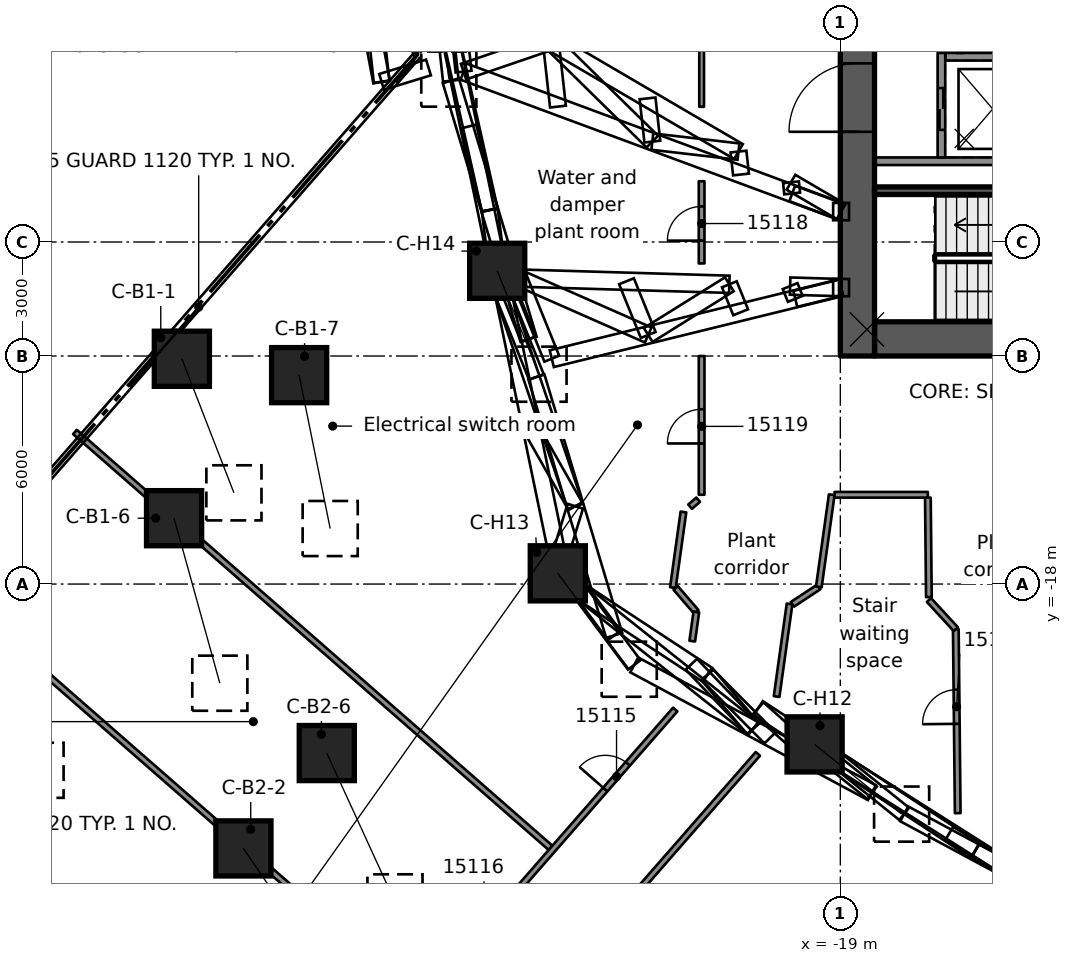
"""IFC4 building model, lengths in metres.
Left out: names, types, materials, properties, quantities, classifications, styles, units other than length and angle.
Written with IfcOpenShell. Run it as: python <this file> out.ifc"""

import sys

from ifc_helpers import new_model, si_unit, direction, frame, frame_2d, origin, origin_2d, place, context, subcontext, project, spatial, rectangle, extrude, element, fill, save


model = new_model("IFC4")
c1 = context("Model", 3, precision=1e-05, world=origin(), true_north=direction((0.0, 1.0)))
c2 = subcontext(c1, "Body", "Model", "MODEL_VIEW")
j1 = project(units=[si_unit("LENGTHUNIT", "METRE"), si_unit("PLANEANGLEUNIT", "RADIAN")], contexts=[c1])
p1 = place(None, origin())
s1 = spatial("IfcSite", under=j1, at=p1, CompositionType="ELEMENT")
p2 = place(p1, origin())
s2 = spatial("IfcBuilding", under=s1, at=p2, CompositionType="ELEMENT")
p3 = place(p2, frame((0.0, 0.0, 76.3)))
s3 = spatial("IfcBuildingStorey", under=s2, at=p3, CompositionType="ELEMENT", Elevation=76.3)
p4 = place(p3, frame((-18.1, -11.55, 0.0), z_axis=(0.0, 0.0, 1.0), x_axis=(1.0, 0.0, 0.0)))
e1 = element("IfcWall", 1, at=p4, inside=s3, PredefinedType="SHEAR", context=c2, shape_type="SweptSolid", body=[
    extrude(rectangle(XDim=9.2, YDim=0.9, at=frame_2d((4.6, 0.0))), origin(), (0.0, 0.0, 1.0), 4.4),
])
p5 = place(p4, frame((5.1, 0.0, 0.0)))
e2 = element("IfcOpeningElement", 2, at=p5, cuts=e1, PredefinedType="OPENING", context=c2, shape_type="SweptSolid", body=[
    extrude(rectangle(XDim=1.1, YDim=2.1, at=frame_2d((0.55, 1.05))), frame((0.0, 0.46, 0.0), z_axis=(0.0, -1.0, 0.0), x_axis=(1.0, 0.0, 0.0)), (0.0, 0.0, 1.0), 0.92),
])
p6 = place(p4, frame((7.53, 0.0, 0.0)))
e3 = element("IfcOpeningElement", 3, at=p6, cuts=e1, PredefinedType="OPENING", context=c2, shape_type="SweptSolid", body=[
    extrude(rectangle(XDim=0.9, YDim=2.1, at=frame_2d((0.45, 1.05))), frame((0.0, 0.46, 0.0), z_axis=(0.0, -1.0, 0.0), x_axis=(1.0, 0.0, 0.0)), (0.0, 0.0, 1.0), 0.92),
])
p7 = place(p3, frame((-18.55, -12.0, 0.0), z_axis=(0.0, 0.0, 1.0), x_axis=(0.0, 1.0, 0.0)))
e4 = element("IfcWall", 4, at=p7, inside=s3, PredefinedType="SHEAR", context=c2, shape_type="SweptSolid", body=[
    extrude(rectangle(XDim=24.0, YDim=0.9, at=frame_2d((12.0, 0.0))), origin(), (0.0, 0.0, 1.0), 4.4),
])
p8 = place(p7, frame((5.9, 0.0, 0.0)))
e5 = element("IfcOpeningElement", 5, at=p8, cuts=e4, PredefinedType="OPENING", context=c2, shape_type="SweptSolid", body=[
    extrude(rectangle(XDim=1.8, YDim=2.1, at=frame_2d((0.9, 1.05))), frame((0.0, 0.46, 0.0), z_axis=(0.0, -1.0, 0.0), x_axis=(1.0, 0.0, 0.0)), (0.0, 0.0, 1.0), 0.92),
])
p9 = place(p7, frame((10.1, 0.0, 0.0)))
e6 = element("IfcOpeningElement", 6, at=p9, cuts=e4, PredefinedType="OPENING", context=c2, shape_type="SweptSolid", body=[
    extrude(rectangle(XDim=1.8, YDim=2.1, at=frame_2d((0.9, 1.05))), frame((0.0, 0.46, 0.0), z_axis=(0.0, -1.0, 0.0), x_axis=(1.0, 0.0, 0.0)), (0.0, 0.0, 1.0), 0.92),
])
p10 = place(p7, frame((14.3, 0.0, 0.0)))
e7 = element("IfcOpeningElement", 7, at=p10, cuts=e4, PredefinedType="OPENING", context=c2, shape_type="SweptSolid", body=[
    extrude(rectangle(XDim=1.8, YDim=2.1, at=frame_2d((0.9, 1.05))), frame((0.0, 0.46, 0.0), z_axis=(0.0, -1.0, 0.0), x_axis=(1.0, 0.0, 0.0)), (0.0, 0.0, 1.0), 0.92),
])
p11 = place(p3, frame((-36.327, -12.072, 0.546), z_axis=(0.27252085226, -0.701871116737, 0.658110416704), x_axis=(0.93219702478, 0.361951249467, 0.0)))
e8 = element("IfcColumn", 8, at=p11, inside=s3, PredefinedType="COLUMN", context=c2, shape_type="SweptSolid", body=[
    extrude(rectangle(XDim=1.45, YDim=1.45, at=origin_2d()), origin(), (0.0, 0.0, 1.0), 5.027),
])
p12 = place(p3, frame((-42.009, -18.571, 0.599), z_axis=(0.324176218571, -0.760615129217, 0.562471692194), x_axis=(0.919932161278, 0.39207756713, 0.0)))
e9 = element("IfcColumn", 9, at=p12, inside=s3, PredefinedType="COLUMN", context=c2, shape_type="SweptSolid", body=[
    extrude(rectangle(XDim=1.45, YDim=1.45, at=origin_2d()), origin(), (0.0, 0.0, 1.0), 5.691),
])
p13 = place(p3, frame((-36.532, -16.267, 0.59), z_axis=(0.217420381869, -0.783982982798, 0.581462862298), x_axis=(0.963629611677, 0.267241410526, 0.0)))
e10 = element("IfcColumn", 10, at=p13, inside=s3, PredefinedType="COLUMN", context=c2, shape_type="SweptSolid", body=[
    extrude(rectangle(XDim=1.45, YDim=1.45, at=origin_2d()), origin(), (0.0, 0.0, 1.0), 5.538),
])
p14 = place(p3, frame((-33.241, -12.503, 0.568), z_axis=(0.155467198112, -0.768136198202, 0.621125374883), x_axis=(0.980126586681, 0.198373067931, 0.0)))
e11 = element("IfcColumn", 11, at=p14, inside=s3, PredefinedType="COLUMN", context=c2, shape_type="SweptSolid", body=[
    extrude(rectangle(XDim=1.45, YDim=1.45, at=origin_2d()), origin(), (0.0, 0.0, 1.0), 5.254),
])
p15 = place(p3, frame((-34.707, -24.956, 0.581), z_axis=(0.451244174402, -0.661514748766, 0.598979909708), x_axis=(0.826104451999, 0.56351702227, 0.0)))
e12 = element("IfcColumn", 12, at=p15, inside=s3, PredefinedType="COLUMN", context=c2, shape_type="SweptSolid", body=[
    extrude(rectangle(XDim=1.45, YDim=1.45, at=origin_2d()), origin(), (0.0, 0.0, 1.0), 5.407),
])
p16 = place(p3, frame((-32.513, -22.447, 0.579), z_axis=(0.332815358907, -0.726323774555, 0.60140478165), x_axis=(0.909104185644, 0.416568817418, 0.0)))
e13 = element("IfcColumn", 13, at=p16, inside=s3, PredefinedType="COLUMN", context=c2, shape_type="SweptSolid", body=[
    extrude(rectangle(XDim=1.45, YDim=1.45, at=origin_2d()), origin(), (0.0, 0.0, 1.0), 5.39),
])
p17 = place(p3, frame((-19.677, -22.219, 0.469), z_axis=(0.504604790097, -0.404114198636, 0.762932316967), x_axis=(0.625100883358, 0.780543967772, 0.0)))
e14 = element("IfcColumn", 14, at=p17, inside=s3, PredefinedType="COLUMN", context=c2, shape_type="SweptSolid", body=[
    extrude(rectangle(XDim=1.45, YDim=1.45, at=origin_2d()), origin(), (0.0, 0.0, 1.0), 4.538),
])
p18 = place(p3, frame((-26.434, -17.718, 0.491), z_axis=(0.404525579295, -0.5431164527, 0.735787723805), x_axis=(0.801988529127, 0.597339433781, 0.0)))
e15 = element("IfcColumn", 15, at=p18, inside=s3, PredefinedType="COLUMN", context=c2, shape_type="SweptSolid", body=[
    extrude(rectangle(XDim=1.45, YDim=1.45, at=origin_2d()), origin(), (0.0, 0.0, 1.0), 4.645),
])
p19 = place(p3, frame((-28.029, -9.758, 0.469), z_axis=(0.242399975133, -0.599329365947, 0.762919761947), x_axis=(0.927046689542, 0.374945909979, 0.0)))
e16 = element("IfcColumn", 16, at=p19, inside=s3, PredefinedType="COLUMN", context=c2, shape_type="SweptSolid", body=[
    extrude(rectangle(XDim=1.45, YDim=1.45, at=origin_2d()), origin(), (0.0, 0.0, 1.0), 4.538),
])
p20 = place(p3, frame((-29.624, -1.797, 0.469), z_axis=(0.070948481985, -0.642678137038, 0.762844102735), x_axis=(0.993961604032, 0.1097284362, 0.0)))
e17 = element("IfcColumn", 17, at=p20, inside=s3, PredefinedType="COLUMN", context=c2, shape_type="SweptSolid", body=[
    extrude(rectangle(XDim=1.45, YDim=1.45, at=origin_2d()), origin(), (0.0, 0.0, 1.0), 4.539),
])
p21 = place(p3, frame((-11.54, -6.875, 0.0), z_axis=(0.0, 0.0, 1.0), x_axis=(-1.0, 0.0, 0.0)))
e18 = element("IfcWall", 18, at=p21, inside=s3, PredefinedType="SOLIDWALL", context=c2, shape_type="SweptSolid", body=[
    extrude(rectangle(XDim=6.56, YDim=0.2, at=frame_2d((3.28, 0.0))), origin(), (0.0, 0.0, 1.0), 3.99),
])
p22 = place(p3, frame((-11.54, -4.125, 0.0), z_axis=(0.0, 0.0, 1.0), x_axis=(-1.0, 0.0, 0.0)))
e19 = element("IfcWall", 19, at=p22, inside=s3, PredefinedType="SOLIDWALL", context=c2, shape_type="SweptSolid", body=[
    extrude(rectangle(XDim=4.7, YDim=0.2, at=frame_2d((2.35, 0.0))), origin(), (0.0, 0.0, 1.0), 3.99),
])
p23 = place(p3, frame((-16.34, -6.775, 0.0), z_axis=(0.0, 0.0, 1.0), x_axis=(0.0, 1.0, 0.0)))
e20 = element("IfcWall", 20, at=p23, inside=s3, PredefinedType="SOLIDWALL", context=c2, shape_type="SweptSolid", body=[
    extrude(rectangle(XDim=2.75, YDim=0.2, at=frame_2d((1.375, 0.0))), origin(), (0.0, 0.0, 1.0), 3.99),
])
p24 = place(p23, frame((0.725, 0.0, 0.0)))
e21 = element("IfcOpeningElement", 21, at=p24, cuts=e20, PredefinedType="OPENING", context=c2, shape_type="SweptSolid", body=[
    extrude(rectangle(XDim=1.1, YDim=2.1, at=frame_2d((0.55, 1.05))), frame((0.0, 0.11, 0.0), z_axis=(0.0, -1.0, 0.0), x_axis=(1.0, 0.0, 0.0)), (0.0, 0.0, 1.0), 0.22),
])
p25 = place(p3, frame((-15.84, -4.025, 0.0), z_axis=(0.0, 0.0, 1.0), x_axis=(0.0, 1.0, 0.0)))
e22 = element("IfcWall", 22, at=p25, inside=s3, PredefinedType="SOLIDWALL", context=c2, shape_type="SweptSolid", body=[
    extrude(rectangle(XDim=8.05, YDim=0.2, at=frame_2d((4.025, 0.0))), origin(), (0.0, 0.0, 1.0), 3.99),
])
p26 = place(p25, frame((3.475, 0.0, 0.0)))
e23 = element("IfcOpeningElement", 23, at=p26, cuts=e22, PredefinedType="OPENING", context=c2, shape_type="SweptSolid", body=[
    extrude(rectangle(XDim=1.1, YDim=2.1, at=frame_2d((0.55, 1.05))), frame((0.0, 0.11, 0.0), z_axis=(0.0, -1.0, 0.0), x_axis=(1.0, 0.0, 0.0)), (0.0, 0.0, 1.0), 0.22),
])
p27 = place(p25, frame((6.225, 0.0, 0.0)))
e24 = element("IfcOpeningElement", 24, at=p27, cuts=e22, PredefinedType="OPENING", context=c2, shape_type="SweptSolid", body=[
    extrude(rectangle(XDim=1.1, YDim=2.1, at=frame_2d((0.55, 1.05))), frame((0.0, 0.11, 0.0), z_axis=(0.0, -1.0, 0.0), x_axis=(1.0, 0.0, 0.0)), (0.0, 0.0, 1.0), 0.22),
])
p28 = place(p3, frame((-11.54, -7.65, 0.0), z_axis=(0.0, 0.0, 1.0), x_axis=(-1.0, 0.0, 0.0)))
e25 = element("IfcWall", 25, at=p28, inside=s3, PredefinedType="SOLIDWALL", context=c2, shape_type="SweptSolid", body=[
    extrude(rectangle(XDim=6.56, YDim=0.2, at=frame_2d((3.28, 0.0))), origin(), (0.0, 0.0, 1.0), 3.99),
])
p29 = place(p3, frame((-16.696, -15.726, 0.0), z_axis=(0.0, 0.0, 1.0), x_axis=(0.009978054026, -0.99995021798, 0.0)))
e26 = element("IfcWall", 26, at=p29, inside=s3, PredefinedType="PARTITIONING", context=c2, shape_type="SweptSolid", body=[
    extrude(rectangle(XDim=2.618, YDim=0.15, at=frame_2d((1.309, 0.0))), origin(), (0.0, 0.0, 1.0), 3.98),
])
p30 = place(p3, frame((-15.911, -24.028, 0.0), z_axis=(0.0, 0.0, 1.0), x_axis=(-0.010337840811, 0.999946563096, 0.0)))
e27 = element("IfcWall", 27, at=p30, inside=s3, PredefinedType="PARTITIONING", context=c2, shape_type="SweptSolid", body=[
    extrude(rectangle(XDim=4.841, YDim=0.15, at=frame_2d((2.421, 0.0))), origin(), (0.0, 0.0, 1.0), 3.98),
])
p31 = place(p30, frame((2.35, 0.0, 0.0)))
e28 = element("IfcOpeningElement", 28, at=p31, cuts=e27, PredefinedType="OPENING", context=c2, shape_type="SweptSolid", body=[
    extrude(rectangle(XDim=0.9, YDim=2.1, at=frame_2d((0.45, 1.05))), frame((0.0, 0.085, 0.0), z_axis=(0.0, -1.0, 0.0), x_axis=(1.0, 0.0, 0.0)), (0.0, 0.0, 1.0), 0.17),
])
p32 = place(p3, frame((-48.313, -24.572, 0.0), z_axis=(0.0, 0.0, 1.0), x_axis=(0.752776539597, -0.658276143751, 0.0)))
e29 = element("IfcWall", 29, at=p32, inside=s3, PredefinedType="PARTITIONING", context=c2, shape_type="SweptSolid", body=[
    extrude(rectangle(XDim=16.571, YDim=0.15, at=frame_2d((8.285, 0.0))), origin(), (0.0, 0.0, 1.0), 3.98),
])
p33 = place(p3, frame((-42.628, -17.987, 0.0), z_axis=(0.0, 0.0, 1.0), x_axis=(0.752830443713, -0.658214496208, 0.0)))
e30 = element("IfcWall", 30, at=p33, inside=s3, PredefinedType="PARTITIONING", context=c2, shape_type="SweptSolid", body=[
    extrude(rectangle(XDim=16.625, YDim=0.15, at=frame_2d((8.312, 0.0))), origin(), (0.0, 0.0, 1.0), 3.98),
])
p34 = place(p3, frame((-39.14, -13.998, 0.0), z_axis=(0.0, 0.0, 1.0), x_axis=(0.752808649714, -0.658239422184, 0.0)))
e31 = element("IfcWall", 31, at=p34, inside=s3, PredefinedType="PARTITIONING", context=c2, shape_type="SweptSolid", body=[
    extrude(rectangle(XDim=16.623, YDim=0.15, at=frame_2d((8.312, 0.0))), origin(), (0.0, 0.0, 1.0), 3.98),
])
p35 = place(p3, frame((-23.332, -18.103, 0.0), z_axis=(0.0, 0.0, 1.0), x_axis=(0.652335975093, -0.757929927896, 0.0)))
e32 = element("IfcWall", 32, at=p35, inside=s3, PredefinedType="PARTITIONING", context=c2, shape_type="SweptSolid", body=[
    extrude(rectangle(XDim=0.832, YDim=0.15, at=frame_2d((0.416, 0.0))), origin(), (0.0, 0.0, 1.0), 3.98),
])
p36 = place(p3, frame((-20.262, -18.534, 0.0), z_axis=(0.0, 0.0, 1.0), x_axis=(0.835371053119, 0.549686459366, 0.0)))
e33 = element("IfcWall", 33, at=p36, inside=s3, PredefinedType="PARTITIONING", context=c2, shape_type="SweptSolid", body=[
    extrude(rectangle(XDim=0.833, YDim=0.15, at=frame_2d((0.417, 0.0))), origin(), (0.0, 0.0, 1.0), 3.98),
])
p37 = place(p3, frame((-19.151, -15.651, 0.0), z_axis=(0.0, 0.0, 1.0), x_axis=(1.0, 0.0, 0.0)))
e34 = element("IfcWall", 34, at=p37, inside=s3, PredefinedType="PARTITIONING", context=c2, shape_type="SweptSolid", body=[
    extrude(rectangle(XDim=2.454, YDim=0.15, at=frame_2d((1.227, 0.0))), origin(), (0.0, 0.0, 1.0), 3.98),
])
p38 = place(p3, frame((-16.668, -18.42, 0.0), z_axis=(0.0, 0.0, 1.0), x_axis=(0.67773560354, -0.735305685885, 0.0)))
e35 = element("IfcWall", 35, at=p38, inside=s3, PredefinedType="PARTITIONING", context=c2, shape_type="SweptSolid", body=[
    extrude(rectangle(XDim=1.043, YDim=0.15, at=frame_2d((0.521, 0.0))), origin(), (0.0, 0.0, 1.0), 3.98),
])
p39 = place(p3, frame((-22.953, -15.964, 0.0), z_axis=(0.0, 0.0, 1.0), x_axis=(0.754942462209, 0.65579103284, 0.0)))
e36 = element("IfcWall", 36, at=p39, inside=s3, PredefinedType="PARTITIONING", context=c2, shape_type="SweptSolid", body=[
    extrude(rectangle(XDim=0.281, YDim=0.15, at=frame_2d((0.14, 0.0))), origin(), (0.0, 0.0, 1.0), 3.98),
])
p40 = place(p3, frame((-21.17, -22.468, 0.0), z_axis=(0.0, 0.0, 1.0), x_axis=(-0.658339236885, -0.752721362243, 0.0)))
e37 = element("IfcWall", 37, at=p40, inside=s3, PredefinedType="PARTITIONING", context=c2, shape_type="SweptSolid", body=[
    extrude(rectangle(XDim=21.951, YDim=0.15, at=frame_2d((10.976, 0.0))), origin(), (0.0, 0.0, 1.0), 3.98),
])
p41 = place(p40, frame((14.601, 0.0, 0.0)))
e38 = element("IfcOpeningElement", 38, at=p41, cuts=e37, PredefinedType="OPENING", context=c2, shape_type="SweptSolid", body=[
    extrude(rectangle(XDim=0.9, YDim=2.1, at=frame_2d((0.45, 1.05))), frame((0.0, 0.085, 0.0), z_axis=(0.0, -1.0, 0.0), x_axis=(1.0, 0.0, 0.0)), (0.0, 0.0, 1.0), 0.17),
])
p42 = place(p3, frame((-39.008, -39.217, 0.0), z_axis=(0.0, 0.0, 1.0), x_axis=(0.658208230207, 0.752835922156, 0.0)))
e39 = element("IfcWall", 39, at=p42, inside=s3, PredefinedType="PARTITIONING", context=c2, shape_type="SweptSolid", body=[
    extrude(rectangle(XDim=23.798, YDim=0.15, at=frame_2d((11.899, 0.0))), origin(), (0.0, 0.0, 1.0), 3.98),
])
p43 = place(p42, frame((21.001, 0.0, 0.0)))
e40 = element("IfcOpeningElement", 40, at=p43, cuts=e39, PredefinedType="OPENING", context=c2, shape_type="SweptSolid", body=[
    extrude(rectangle(XDim=0.9, YDim=2.1, at=frame_2d((0.45, 1.05))), frame((0.0, 0.085, 0.0), z_axis=(0.0, -1.0, 0.0), x_axis=(1.0, 0.0, 0.0)), (0.0, 0.0, 1.0), 0.17),
])
p44 = place(p42, frame((15.7, 0.0, 0.0)))
e41 = element("IfcOpeningElement", 41, at=p44, cuts=e39, PredefinedType="OPENING", context=c2, shape_type="SweptSolid", body=[
    extrude(rectangle(XDim=0.9, YDim=2.1, at=frame_2d((0.45, 1.05))), frame((0.0, 0.085, 0.0), z_axis=(0.0, -1.0, 0.0), x_axis=(1.0, 0.0, 0.0)), (0.0, 0.0, 1.0), 0.17),
])
p45 = place(p42, frame((8.749, 0.0, 0.0)))
e42 = element("IfcOpeningElement", 42, at=p45, cuts=e39, PredefinedType="OPENING", context=c2, shape_type="SweptSolid", body=[
    extrude(rectangle(XDim=0.9, YDim=2.1, at=frame_2d((0.45, 1.05))), frame((0.0, 0.085, 0.0), z_axis=(0.0, -1.0, 0.0), x_axis=(1.0, 0.0, 0.0)), (0.0, 0.0, 1.0), 0.17),
])
p46 = place(p3, frame((-19.566, -18.076, 0.0), z_axis=(0.0, 0.0, 1.0), x_axis=(0.138782784775, 0.990322845667, 0.0)))
e43 = element("IfcWall", 43, at=p46, inside=s3, PredefinedType="PARTITIONING", context=c2, shape_type="SweptSolid", body=[
    extrude(rectangle(XDim=2.449, YDim=0.15, at=frame_2d((1.224, 0.0))), origin(), (0.0, 0.0, 1.0), 3.98),
])
p47 = place(p3, frame((-20.677, -20.96, 0.0), z_axis=(0.0, 0.0, 1.0), x_axis=(0.138655632088, 0.990340656386, 0.0)))
e44 = element("IfcWall", 44, at=p47, inside=s3, PredefinedType="PARTITIONING", context=c2, shape_type="SweptSolid", body=[
    extrude(rectangle(XDim=2.46, YDim=0.15, at=frame_2d((1.23, 0.0))), origin(), (0.0, 0.0, 1.0), 3.98),
])
p48 = place(p3, frame((-22.897, -19.502, 0.0), z_axis=(0.0, 0.0, 1.0), x_axis=(0.139129433731, 0.990274204789, 0.0)))
e45 = element("IfcWall", 45, at=p48, inside=s3, PredefinedType="PARTITIONING", context=c2, shape_type="SweptSolid", body=[
    extrude(rectangle(XDim=0.776, YDim=0.15, at=frame_2d((0.388, 0.0))), origin(), (0.0, 0.0, 1.0), 3.98),
])
p49 = place(p3, frame((-23.406, -18.093, 0.0), z_axis=(0.0, 0.0, 1.0), x_axis=(0.138392820207, 0.990377416602, 0.0)))
e46 = element("IfcWall", 46, at=p49, inside=s3, PredefinedType="PARTITIONING", context=c2, shape_type="SweptSolid", body=[
    extrude(rectangle(XDim=2.009, YDim=0.15, at=frame_2d((1.005, 0.0))), origin(), (0.0, 0.0, 1.0), 3.98),
])
p50 = place(p3, frame((-22.65, -15.651, 0.0), z_axis=(0.0, 0.0, 1.0), x_axis=(0.0, 1.0, 0.0)))
e47 = element("IfcWall", 47, at=p50, inside=s3, PredefinedType="PARTITIONING", context=c2, shape_type="SweptSolid", body=[
    extrude(rectangle(XDim=3.651, YDim=0.15, at=frame_2d((1.825, 0.0))), origin(), (0.0, 0.0, 1.0), 3.98),
])
p51 = place(p50, frame((1.35, 0.0, 0.0)))
e48 = element("IfcOpeningElement", 48, at=p51, cuts=e47, PredefinedType="OPENING", context=c2, shape_type="SweptSolid", body=[
    extrude(rectangle(XDim=0.9, YDim=2.1, at=frame_2d((0.45, 1.05))), frame((0.0, 0.085, 0.0), z_axis=(0.0, -1.0, 0.0), x_axis=(1.0, 0.0, 0.0)), (0.0, 0.0, 1.0), 0.17),
])
p52 = place(p3, frame((-22.65, -9.564, 0.0), z_axis=(0.0, 0.0, 1.0), x_axis=(0.0, 1.0, 0.0)))
e49 = element("IfcWall", 49, at=p52, inside=s3, PredefinedType="PARTITIONING", context=c2, shape_type="SweptSolid", body=[
    extrude(rectangle(XDim=2.163, YDim=0.15, at=frame_2d((1.082, 0.0))), origin(), (0.0, 0.0, 1.0), 3.98),
])
p53 = place(p52, frame((0.6, 0.0, 0.0)))
e50 = element("IfcOpeningElement", 50, at=p53, cuts=e49, PredefinedType="OPENING", context=c2, shape_type="SweptSolid", body=[
    extrude(rectangle(XDim=0.9, YDim=2.1, at=frame_2d((0.45, 1.05))), frame((0.0, 0.085, 0.0), z_axis=(0.0, -1.0, 0.0), x_axis=(1.0, 0.0, 0.0)), (0.0, 0.0, 1.0), 0.17),
])
p54 = place(p3, frame((-22.65, -5.442, 0.0), z_axis=(0.0, 0.0, 1.0), x_axis=(0.0, 1.0, 0.0)))
e51 = element("IfcWall", 51, at=p54, inside=s3, PredefinedType="PARTITIONING", context=c2, shape_type="SweptSolid", body=[
    extrude(rectangle(XDim=11.694, YDim=0.125, at=frame_2d((5.847, 0.0))), origin(), (0.0, 0.0, 1.0), 3.98),
])
p55 = place(p54, frame((5.35, 0.0, 0.0)))
e52 = element("IfcOpeningElement", 52, at=p55, cuts=e51, PredefinedType="OPENING", context=c2, shape_type="SweptSolid", body=[
    extrude(rectangle(XDim=1.1, YDim=2.1, at=frame_2d((0.55, 1.05))), frame((0.0, 0.073, 0.0), z_axis=(0.0, -1.0, 0.0), x_axis=(1.0, 0.0, 0.0)), (0.0, 0.0, 1.0), 0.145),
])
p56 = place(p24, origin())
e53 = element("IfcDoor", 53, at=p56, inside=s3, OperationType="DOUBLE_DOOR_SLIDING", PredefinedType="DOOR", context=c2, shape_type="SweptSolid", body=[
    extrude(rectangle(XDim=1.1, YDim=2.1, at=frame_2d((0.55, 1.05))), frame((0.0, 0.025, 0.0), z_axis=(0.0, -1.0, 0.0), x_axis=(1.0, 0.0, 0.0)), (0.0, 0.0, 1.0), 0.05),
])
fill(e21, e53)
p57 = place(p8, origin())
e54 = element("IfcDoor", 54, at=p57, inside=s3, OperationType="SINGLE_SWING_LEFT", PredefinedType="DOOR", context=c2, shape_type="SweptSolid", body=[
    extrude(rectangle(XDim=1.8, YDim=2.1, at=frame_2d((0.9, 1.05))), frame((0.0, 0.025, 0.0), z_axis=(0.0, -1.0, 0.0), x_axis=(1.0, 0.0, 0.0)), (0.0, 0.0, 1.0), 0.05),
])
fill(e5, e54)
p58 = place(p43, origin())
e55 = element("IfcDoor", 55, at=p58, inside=s3, OperationType="SINGLE_SWING_RIGHT", PredefinedType="DOOR", context=c2, shape_type="SweptSolid", body=[
    extrude(rectangle(XDim=0.9, YDim=2.1, at=frame_2d((0.45, 1.05))), frame((0.0, 0.025, 0.0), z_axis=(0.0, -1.0, 0.0), x_axis=(1.0, 0.0, 0.0)), (0.0, 0.0, 1.0), 0.05),
])
fill(e40, e55)
p59 = place(p53, origin())
e56 = element("IfcDoor", 56, at=p59, inside=s3, OperationType="SINGLE_SWING_LEFT", PredefinedType="DOOR", context=c2, shape_type="SweptSolid", body=[
    extrude(rectangle(XDim=0.9, YDim=2.1, at=frame_2d((0.45, 1.05))), frame((0.0, 0.025, 0.0), z_axis=(0.0, -1.0, 0.0), x_axis=(1.0, 0.0, 0.0)), (0.0, 0.0, 1.0), 0.05),
])
fill(e50, e56)
p60 = place(p51, origin())
e57 = element("IfcDoor", 57, at=p60, inside=s3, OperationType="SINGLE_SWING_LEFT", PredefinedType="DOOR", context=c2, shape_type="SweptSolid", body=[
    extrude(rectangle(XDim=0.9, YDim=2.1, at=frame_2d((0.45, 1.05))), frame((0.0, 0.025, 0.0), z_axis=(0.0, -1.0, 0.0), x_axis=(1.0, 0.0, 0.0)), (0.0, 0.0, 1.0), 0.05),
])
fill(e48, e57)
p61 = place(p31, origin())
e58 = element("IfcDoor", 58, at=p61, inside=s3, OperationType="SINGLE_SWING_RIGHT", PredefinedType="DOOR", context=c2, shape_type="SweptSolid", body=[
    extrude(rectangle(XDim=0.9, YDim=2.1, at=frame_2d((0.45, 1.05))), frame((0.0, 0.025, 0.0), z_axis=(0.0, -1.0, 0.0), x_axis=(1.0, 0.0, 0.0)), (0.0, 0.0, 1.0), 0.05),
])
fill(e28, e58)
save(model, sys.argv[1])
